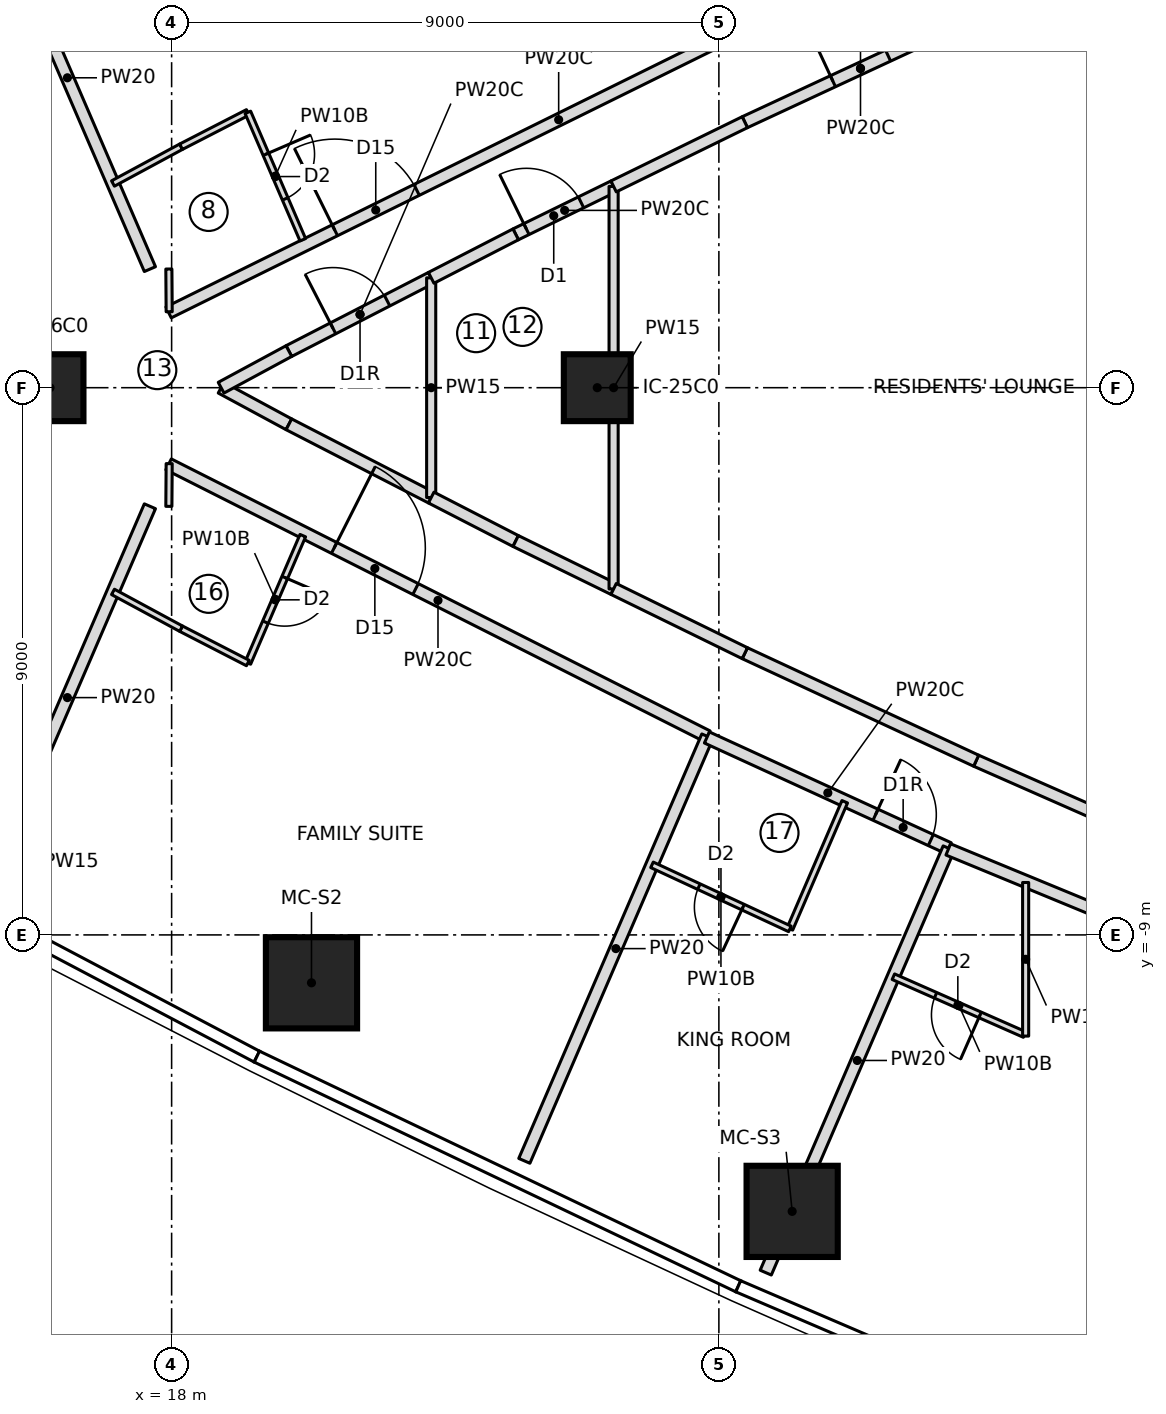
"""IFC4 building model, lengths in metres.
Left out: names, types, materials, properties, quantities, classifications, styles, units other than length and angle.
Written with IfcOpenShell. Run it as: python <this file> out.ifc"""

import sys

from ifc_helpers import new_model, si_unit, direction, frame, frame_2d, origin, origin_2d, place, context, subcontext, project, spatial, rectangle, extrude, element, fill, save


model = new_model("IFC4")
c1 = context("Model", 3, precision=1e-05, world=origin(), true_north=direction((0.0, 1.0)))
c2 = subcontext(c1, "Body", "Model", "MODEL_VIEW")
j1 = project(units=[si_unit("LENGTHUNIT", "METRE"), si_unit("PLANEANGLEUNIT", "RADIAN")], contexts=[c1])
p1 = place(None, origin())
s1 = spatial("IfcSite", under=j1, at=p1, CompositionType="ELEMENT")
p2 = place(p1, origin())
s2 = spatial("IfcBuilding", under=s1, at=p2, CompositionType="ELEMENT")
p3 = place(p2, frame((0.0, 0.0, 130.2)))
s3 = spatial("IfcBuildingStorey", under=s2, at=p3, CompositionType="ELEMENT", Elevation=130.2)
for number, where, z_axis, x_axis in (
    (1, (20.3, -9.788, 0.0), (0.0, 0.0, 1.0), (1.0, 0.0, 0.0)),
    (2, (28.205, -13.547, 0.0), (0.0, 0.0, 1.0), (1.0, 0.0, 0.0)),
):
    element("IfcColumn", number, at=place(p3, frame(where, z_axis=z_axis, x_axis=x_axis)), inside=s3, PredefinedType="COLUMN", context=c2, shape_type="SweptSolid", body=[
        extrude(rectangle(XDim=1.5, YDim=1.5, at=origin_2d()), origin(), (0.0, 0.0, 1.0), 3.55),
    ])
for number, where, z_axis, x_axis in (
    (3, (16.0, 0.0, 0.0), (0.0, 0.0, 1.0), (1.0, 0.0, 0.0)),
    (4, (25.0, 0.0, 0.0), (0.0, 0.0, 1.0), (1.0, 0.0, 0.0)),
):
    element("IfcColumn", number, at=place(p3, frame(where, z_axis=z_axis, x_axis=x_axis)), inside=s3, PredefinedType="COLUMN", context=c2, shape_type="SweptSolid", body=[
        extrude(rectangle(XDim=1.1, YDim=1.1, at=origin_2d()), origin(), (0.0, 0.0, 1.0), 3.55),
    ])
p4 = place(p3, frame((17.643, 1.95, 0.0), z_axis=(0.0, 0.0, 1.0), x_axis=(-0.395994543879, 0.918252863441, 0.0)))
e5 = element("IfcWall", 5, at=p4, inside=s3, PredefinedType="PARTITIONING", context=c2, shape_type="SweptSolid", body=[
    extrude(rectangle(XDim=6.854, YDim=0.2, at=frame_2d((3.427, 0.0))), origin(), (0.0, 0.0, 1.0), 3.25),
])
p5 = place(p3, frame((17.95, 1.238, 0.0), z_axis=(0.0, 0.0, 1.0), x_axis=(0.896593504408, 0.44285447706, 0.0)))
e6 = element("IfcWall", 6, at=p5, inside=s3, PredefinedType="PARTITIONING", context=c2, shape_type="SweptSolid", body=[
    extrude(rectangle(XDim=14.31, YDim=0.2, at=frame_2d((7.155, 0.0))), origin(), (0.0, 0.0, 1.0), 3.25),
])
p6 = place(p5, frame((3.05, 0.0, 0.0)))
e7 = element("IfcOpeningElement", 7, at=p6, cuts=e6, PredefinedType="OPENING", context=c2, shape_type="SweptSolid", body=[
    extrude(rectangle(XDim=1.5, YDim=2.1, at=frame_2d((0.75, 1.05))), frame((0.0, 0.11, 0.0), z_axis=(0.0, -1.0, 0.0), x_axis=(1.0, 0.0, 0.0)), (0.0, 0.0, 1.0), 0.22),
])
p7 = place(p3, frame((17.036, 3.358, 0.0), z_axis=(0.0, 0.0, 1.0), x_axis=(0.879823588489, 0.475300382009, 0.0)))
e8 = element("IfcWall", 8, at=p7, inside=s3, PredefinedType="PARTITIONING", context=c2, shape_type="SweptSolid", body=[
    extrude(rectangle(XDim=1.273, YDim=0.1, at=frame_2d((0.636, 0.0))), origin(), (0.0, 0.0, 1.0), 3.25),
])
p8 = place(p3, frame((18.156, 3.963, 0.0), z_axis=(0.0, 0.0, 1.0), x_axis=(0.889106231322, 0.457700895154, 0.0)))
e9 = element("IfcWall", 9, at=p8, inside=s3, PredefinedType="PARTITIONING", context=c2, shape_type="SweptSolid", body=[
    extrude(rectangle(XDim=1.235, YDim=0.1, at=frame_2d((0.617, 0.0))), origin(), (0.0, 0.0, 1.0), 3.25),
])
p9 = place(p3, frame((19.254, 4.529, 0.0), z_axis=(0.0, 0.0, 1.0), x_axis=(0.395958457437, -0.9182684248, 0.0)))
e10 = element("IfcWall", 10, at=p9, inside=s3, PredefinedType="PARTITIONING", context=c2, shape_type="SweptSolid", body=[
    extrude(rectangle(XDim=2.282, YDim=0.1, at=frame_2d((1.141, 0.0))), origin(), (0.0, 0.0, 1.0), 3.25),
])
p10 = place(p9, frame((0.75, 0.0, 0.0)))
e11 = element("IfcOpeningElement", 11, at=p10, cuts=e10, PredefinedType="OPENING", context=c2, shape_type="SweptSolid", body=[
    extrude(rectangle(XDim=0.8, YDim=2.1, at=frame_2d((0.4, 1.05))), frame((0.0, 0.06, 0.0), z_axis=(0.0, -1.0, 0.0), x_axis=(1.0, 0.0, 0.0)), (0.0, 0.0, 1.0), 0.12),
])
p11 = place(p3, frame((14.929, -8.244, 0.0), z_axis=(0.0, 0.0, 1.0), x_axis=(0.395994543879, 0.918252863441, 0.0)))
e12 = element("IfcWall", 12, at=p11, inside=s3, PredefinedType="PARTITIONING", context=c2, shape_type="SweptSolid", body=[
    extrude(rectangle(XDim=6.854, YDim=0.2, at=frame_2d((3.427, 0.0))), origin(), (0.0, 0.0, 1.0), 3.25),
])
p12 = place(p3, frame((17.95, -1.261, 0.0), z_axis=(0.0, 0.0, 1.0), x_axis=(0.892679126003, -0.450692775623, 0.0)))
e13 = element("IfcWall", 13, at=p12, inside=s3, PredefinedType="PARTITIONING", context=c2, shape_type="SweptSolid", body=[
    extrude(rectangle(XDim=9.927, YDim=0.2, at=frame_2d((4.963, 0.0))), origin(), (0.0, 0.0, 1.0), 3.25),
])
p13 = place(p12, frame((3.05, 0.0, 0.0)))
e14 = element("IfcOpeningElement", 14, at=p13, cuts=e13, PredefinedType="OPENING", context=c2, shape_type="SweptSolid", body=[
    extrude(rectangle(XDim=1.5, YDim=2.1, at=frame_2d((0.75, 1.05))), frame((0.0, 0.11, 0.0), z_axis=(0.0, -1.0, 0.0), x_axis=(1.0, 0.0, 0.0)), (0.0, 0.0, 1.0), 0.22),
])
p14 = place(p3, frame((20.157, -2.433, 0.0), z_axis=(0.0, 0.0, 1.0), x_axis=(-0.395958457437, -0.9182684248, 0.0)))
e15 = element("IfcWall", 15, at=p14, inside=s3, PredefinedType="PARTITIONING", context=c2, shape_type="SweptSolid", body=[
    extrude(rectangle(XDim=2.282, YDim=0.1, at=frame_2d((1.141, 0.0))), origin(), (0.0, 0.0, 1.0), 3.25),
])
p15 = place(p14, frame((0.75, 0.0, 0.0)))
e16 = element("IfcOpeningElement", 16, at=p15, cuts=e15, PredefinedType="OPENING", context=c2, shape_type="SweptSolid", body=[
    extrude(rectangle(XDim=0.8, YDim=2.1, at=frame_2d((0.4, 1.05))), frame((0.0, 0.06, 0.0), z_axis=(0.0, -1.0, 0.0), x_axis=(1.0, 0.0, 0.0)), (0.0, 0.0, 1.0), 0.12),
])
p16 = place(p3, frame((19.253, -4.529, 0.0), z_axis=(0.0, 0.0, 1.0), x_axis=(-0.889106231322, 0.457700895154, 0.0)))
e17 = element("IfcWall", 17, at=p16, inside=s3, PredefinedType="PARTITIONING", context=c2, shape_type="SweptSolid", body=[
    extrude(rectangle(XDim=1.235, YDim=0.1, at=frame_2d((0.617, 0.0))), origin(), (0.0, 0.0, 1.0), 3.25),
])
p17 = place(p3, frame((18.156, -3.963, 0.0), z_axis=(0.0, 0.0, 1.0), x_axis=(-0.879823588489, 0.475300382009, 0.0)))
e18 = element("IfcWall", 18, at=p17, inside=s3, PredefinedType="PARTITIONING", context=c2, shape_type="SweptSolid", body=[
    extrude(rectangle(XDim=1.273, YDim=0.1, at=frame_2d((0.636, 0.0))), origin(), (0.0, 0.0, 1.0), 3.25),
])
p18 = place(p3, frame((23.801, -12.716, 0.0), z_axis=(0.0, 0.0, 1.0), x_axis=(0.395995556294, 0.918252426839, 0.0)))
e19 = element("IfcWall", 19, at=p18, inside=s3, PredefinedType="PARTITIONING", context=c2, shape_type="SweptSolid", body=[
    extrude(rectangle(XDim=7.603, YDim=0.2, at=frame_2d((3.802, 0.0))), origin(), (0.0, 0.0, 1.0), 3.25),
])
p19 = place(p3, frame((26.803, -5.753, 0.0), z_axis=(0.0, 0.0, 1.0), x_axis=(0.90910092787, -0.416575926987, 0.0)))
e20 = element("IfcWall", 20, at=p19, inside=s3, PredefinedType="PARTITIONING", context=c2, shape_type="SweptSolid", body=[
    extrude(rectangle(XDim=4.375, YDim=0.2, at=frame_2d((2.188, 0.0))), origin(), (0.0, 0.0, 1.0), 3.25),
])
p20 = place(p19, frame((3.05, 0.0, 0.0)))
e21 = element("IfcOpeningElement", 21, at=p20, cuts=e20, PredefinedType="OPENING", context=c2, shape_type="SweptSolid", body=[
    extrude(rectangle(XDim=1.0, YDim=2.1, at=frame_2d((0.5, 1.05))), frame((0.0, 0.11, 0.0), z_axis=(0.0, -1.0, 0.0), x_axis=(1.0, 0.0, 0.0)), (0.0, 0.0, 1.0), 0.22),
])
p21 = place(p3, frame((29.07, -6.81, 0.0), z_axis=(0.0, 0.0, 1.0), x_axis=(-0.396000751487, -0.918250186399, 0.0)))
e22 = element("IfcWall", 22, at=p21, inside=s3, PredefinedType="PARTITIONING", context=c2, shape_type="SweptSolid", body=[
    extrude(rectangle(XDim=2.278, YDim=0.1, at=frame_2d((1.139, 0.0))), origin(), (0.0, 0.0, 1.0), 3.25),
])
p22 = place(p3, frame((28.168, -8.902, 0.0), z_axis=(0.0, 0.0, 1.0), x_axis=(-0.906813113059, 0.421532890751, 0.0)))
e23 = element("IfcWall", 23, at=p22, inside=s3, PredefinedType="PARTITIONING", context=c2, shape_type="SweptSolid", body=[
    extrude(rectangle(XDim=2.501, YDim=0.1, at=frame_2d((1.25, 0.0))), origin(), (0.0, 0.0, 1.0), 3.25),
])
p23 = place(p22, frame((0.85, 0.0, 0.0)))
e24 = element("IfcOpeningElement", 24, at=p23, cuts=e23, PredefinedType="OPENING", context=c2, shape_type="SweptSolid", body=[
    extrude(rectangle(XDim=0.8, YDim=2.1, at=frame_2d((0.4, 1.05))), frame((0.0, 0.06, 0.0), z_axis=(0.0, -1.0, 0.0), x_axis=(1.0, 0.0, 0.0)), (0.0, 0.0, 1.0), 0.12),
])
p24 = place(p3, frame((27.771, -14.554, 0.0), z_axis=(0.0, 0.0, 1.0), x_axis=(0.396004020147, 0.918248776763, 0.0)))
e25 = element("IfcWall", 25, at=p24, inside=s3, PredefinedType="PARTITIONING", context=c2, shape_type="SweptSolid", body=[
    extrude(rectangle(XDim=7.6, YDim=0.2, at=frame_2d((3.8, 0.0))), origin(), (0.0, 0.0, 1.0), 3.25),
])
p25 = place(p3, frame((30.772, -7.594, 0.0), z_axis=(0.0, 0.0, 1.0), x_axis=(0.924461873383, -0.381274500407, 0.0)))
e26 = element("IfcWall", 26, at=p25, inside=s3, PredefinedType="PARTITIONING", context=c2, shape_type="SweptSolid", body=[
    extrude(rectangle(XDim=13.127, YDim=0.2, at=frame_2d((6.564, 0.0))), origin(), (0.0, 0.0, 1.0), 3.25),
])
p26 = place(p25, frame((4.25, 0.0, 0.0)))
e27 = element("IfcOpeningElement", 27, at=p26, cuts=e26, PredefinedType="OPENING", context=c2, shape_type="SweptSolid", body=[
    extrude(rectangle(XDim=1.5, YDim=2.1, at=frame_2d((0.75, 1.05))), frame((0.0, 0.11, 0.0), z_axis=(0.0, -1.0, 0.0), x_axis=(1.0, 0.0, 0.0)), (0.0, 0.0, 1.0), 0.22),
])
p27 = place(p3, frame((32.028, -10.638, 0.0), z_axis=(0.0, 0.0, 1.0), x_axis=(-0.915108845766, 0.403206895278, 0.0)))
e28 = element("IfcWall", 28, at=p27, inside=s3, PredefinedType="PARTITIONING", context=c2, shape_type="SweptSolid", body=[
    extrude(rectangle(XDim=2.358, YDim=0.1, at=frame_2d((1.179, 0.0))), origin(), (0.0, 0.0, 1.0), 3.25),
])
p28 = place(p27, frame((0.8, 0.0, 0.0)))
e29 = element("IfcOpeningElement", 29, at=p28, cuts=e28, PredefinedType="OPENING", context=c2, shape_type="SweptSolid", body=[
    extrude(rectangle(XDim=0.8, YDim=2.1, at=frame_2d((0.4, 1.05))), frame((0.0, 0.06, 0.0), z_axis=(0.0, -1.0, 0.0), x_axis=(1.0, 0.0, 0.0)), (0.0, 0.0, 1.0), 0.12),
])
p29 = place(p3, frame((19.928, 0.602, 0.0), z_axis=(0.0, 0.0, 1.0), x_axis=(0.889134700325, 0.457645588505, 0.0)))
e30 = element("IfcWall", 30, at=p29, inside=s3, PredefinedType="PARTITIONING", context=c2, shape_type="SweptSolid", body=[
    extrude(rectangle(XDim=2.632, YDim=0.2, at=frame_2d((1.316, 0.0))), origin(), (0.0, 0.0, 1.0), 3.25),
])
p30 = place(p29, frame((0.816, 0.0, 0.0)))
e31 = element("IfcOpeningElement", 31, at=p30, cuts=e30, PredefinedType="OPENING", context=c2, shape_type="SweptSolid", body=[
    extrude(rectangle(XDim=1.0, YDim=2.1, at=frame_2d((0.5, 1.05))), frame((0.0, 0.11, 0.0), z_axis=(0.0, -1.0, 0.0), x_axis=(1.0, 0.0, 0.0)), (0.0, 0.0, 1.0), 0.22),
])
for number, where, z_axis, x_axis in (
    (32, (19.928, -0.602, 0.0), (0.0, 0.0, 1.0), (-0.88, 0.475, 0.0)),
    (33, (18.814, 0.0, 0.0), (0.0, 0.0, 1.0), (0.88, 0.475, 0.0)),
):
    element("IfcWall", number, at=place(p3, frame(where, z_axis=z_axis, x_axis=x_axis)), inside=s3, PredefinedType="PARTITIONING", context=c2, shape_type="SweptSolid", body=[
        extrude(rectangle(XDim=1.267, YDim=0.2, at=frame_2d((0.633, 0.0))), origin(), (0.0, 0.0, 1.0), 3.25),
    ])
p31 = place(p3, frame((22.269, -1.807, 0.0), z_axis=(0.0, 0.0, 1.0), x_axis=(-0.889134700325, 0.457645588505, 0.0)))
e34 = element("IfcWall", 34, at=p31, inside=s3, PredefinedType="PARTITIONING", context=c2, shape_type="SweptSolid", body=[
    extrude(rectangle(XDim=2.632, YDim=0.2, at=frame_2d((1.316, 0.0))), origin(), (0.0, 0.0, 1.0), 3.25),
])
p32 = place(p3, frame((22.269, -1.807, 0.0), z_axis=(0.0, 0.0, 1.0), x_axis=(0.0, 1.0, 0.0)))
e35 = element("IfcWall", 35, at=p32, inside=s3, PredefinedType="PARTITIONING", context=c2, shape_type="SweptSolid", body=[
    extrude(rectangle(XDim=3.613, YDim=0.15, at=frame_2d((1.807, 0.0))), origin(), (0.0, 0.0, 1.0), 3.25),
])
p33 = place(p3, frame((23.659, 2.522, 0.0), z_axis=(0.0, 0.0, 1.0), x_axis=(0.898127473276, 0.439735195028, 0.0)))
e36 = element("IfcWall", 36, at=p33, inside=s3, PredefinedType="PARTITIONING", context=c2, shape_type="SweptSolid", body=[
    extrude(rectangle(XDim=1.793, YDim=0.2, at=frame_2d((0.896, 0.0))), origin(), (0.0, 0.0, 1.0), 3.25),
])
p34 = place(p33, frame((0.196, 0.0, 0.0)))
e37 = element("IfcOpeningElement", 37, at=p34, cuts=e36, PredefinedType="OPENING", context=c2, shape_type="SweptSolid", body=[
    extrude(rectangle(XDim=1.0, YDim=2.1, at=frame_2d((0.5, 1.05))), frame((0.0, 0.11, 0.0), z_axis=(0.0, -1.0, 0.0), x_axis=(1.0, 0.0, 0.0)), (0.0, 0.0, 1.0), 0.22),
])
for number, where, z_axis, x_axis in (
    (38, (23.659, -2.522, 0.0), (0.0, 0.0, 1.0), (-0.889, 0.458, 0.0)),
    (39, (22.269, 1.807, 0.0), (0.0, 0.0, 1.0), (0.889, 0.458, 0.0)),
):
    element("IfcWall", number, at=place(p3, frame(where, z_axis=z_axis, x_axis=x_axis)), inside=s3, PredefinedType="PARTITIONING", context=c2, shape_type="SweptSolid", body=[
        extrude(rectangle(XDim=1.563, YDim=0.2, at=frame_2d((0.782, 0.0))), origin(), (0.0, 0.0, 1.0), 3.25),
    ])
p35 = place(p3, frame((25.269, -3.31, 0.0), z_axis=(0.0, 0.0, 1.0), x_axis=(-0.898127473276, 0.439735195028, 0.0)))
e40 = element("IfcWall", 40, at=p35, inside=s3, PredefinedType="PARTITIONING", context=c2, shape_type="SweptSolid", body=[
    extrude(rectangle(XDim=1.793, YDim=0.2, at=frame_2d((0.896, 0.0))), origin(), (0.0, 0.0, 1.0), 3.25),
])
p36 = place(p3, frame((25.269, -3.31, 0.0), z_axis=(0.0, 0.0, 1.0), x_axis=(0.0, 1.0, 0.0)))
e41 = element("IfcWall", 41, at=p36, inside=s3, PredefinedType="PARTITIONING", context=c2, shape_type="SweptSolid", body=[
    extrude(rectangle(XDim=6.621, YDim=0.15, at=frame_2d((3.31, 0.0))), origin(), (0.0, 0.0, 1.0), 3.25),
])
p37 = place(p3, frame((27.427, 4.367, 0.0), z_axis=(0.0, 0.0, 1.0), x_axis=(0.906830275285, 0.421495968933, 0.0)))
e42 = element("IfcWall", 42, at=p37, inside=s3, PredefinedType="PARTITIONING", context=c2, shape_type="SweptSolid", body=[
    extrude(rectangle(XDim=4.195, YDim=0.2, at=frame_2d((2.098, 0.0))), origin(), (0.0, 0.0, 1.0), 3.25),
])
p38 = place(p37, frame((1.598, 0.0, 0.0)))
e43 = element("IfcOpeningElement", 43, at=p38, cuts=e42, PredefinedType="OPENING", context=c2, shape_type="SweptSolid", body=[
    extrude(rectangle(XDim=1.0, YDim=2.1, at=frame_2d((0.5, 1.05))), frame((0.0, 0.11, 0.0), z_axis=(0.0, -1.0, 0.0), x_axis=(1.0, 0.0, 0.0)), (0.0, 0.0, 1.0), 0.22),
])
p39 = place(p3, frame((33.308, -7.05, 0.0), z_axis=(0.0, 0.0, 1.0), x_axis=(-0.915102334452, 0.403221672881, 0.0)))
e44 = element("IfcWall", 44, at=p39, inside=s3, PredefinedType="PARTITIONING", context=c2, shape_type="SweptSolid", body=[
    extrude(rectangle(XDim=2.269, YDim=0.2, at=frame_2d((1.135, 0.0))), origin(), (0.0, 0.0, 1.0), 3.25),
])
p40 = place(p3, frame((31.231, -6.135, 0.0), z_axis=(0.0, 0.0, 1.0), x_axis=(-0.906830275285, 0.421495968933, 0.0)))
e45 = element("IfcWall", 45, at=p40, inside=s3, PredefinedType="PARTITIONING", context=c2, shape_type="SweptSolid", body=[
    extrude(rectangle(XDim=4.195, YDim=0.2, at=frame_2d((2.098, 0.0))), origin(), (0.0, 0.0, 1.0), 3.25),
])
for number, where, z_axis, x_axis in (
    (46, (27.427, -4.367, 0.0), (0.0, 0.0, 1.0), (-0.898, 0.44, 0.0)),
    (47, (25.269, 3.31, 0.0), (0.0, 0.0, 1.0), (0.898, 0.44, 0.0)),
):
    element("IfcWall", number, at=place(p3, frame(where, z_axis=z_axis, x_axis=x_axis)), inside=s3, PredefinedType="PARTITIONING", context=c2, shape_type="SweptSolid", body=[
        extrude(rectangle(XDim=2.403, YDim=0.2, at=frame_2d((1.201, 0.0))), origin(), (0.0, 0.0, 1.0), 3.25),
    ])
for number, where, z_axis, x_axis in (
    (48, (17.96, 1.249, 0.0), (0.0, 0.0, 1.0), (-0.007, 1.0, 0.0)),
    (49, (17.955, -1.952, 0.0), (0.0, 0.0, 1.0), (0.007, 1.0, 0.0)),
):
    element("IfcWall", number, at=place(p3, frame(where, z_axis=z_axis, x_axis=x_axis)), inside=s3, PredefinedType="PARTITIONING", context=c2, shape_type="SweptSolid", body=[
        extrude(rectangle(XDim=0.703, YDim=0.1, at=frame_2d((0.352, 0.0))), origin(), (0.0, 0.0, 1.0), 3.25),
    ])
p41 = place(p3, frame((32.045, -8.138, 0.0), z_axis=(0.0, 0.0, 1.0), x_axis=(0.0, -1.0, 0.0)))
e50 = element("IfcWall", 50, at=p41, inside=s3, PredefinedType="PARTITIONING", context=c2, shape_type="SweptSolid", body=[
    extrude(rectangle(XDim=2.526, YDim=0.1, at=frame_2d((1.263, 0.0))), origin(), (0.0, 0.0, 1.0), 3.25),
])
p42 = place(p10, origin())
e51 = element("IfcDoor", 51, at=p42, inside=s3, OperationType="SINGLE_SWING_LEFT", PredefinedType="DOOR", context=c2, shape_type="SweptSolid", body=[
    extrude(rectangle(XDim=0.8, YDim=2.1, at=frame_2d((0.4, 1.05))), frame((0.0, 0.025, 0.0), z_axis=(0.0, -1.0, 0.0), x_axis=(1.0, 0.0, 0.0)), (0.0, 0.0, 1.0), 0.05),
])
fill(e11, e51)
p43 = place(p6, origin())
e52 = element("IfcDoor", 52, at=p43, inside=s3, OperationType="DOUBLE_DOOR_SINGLE_SWING", PredefinedType="DOOR", context=c2, shape_type="SweptSolid", body=[
    extrude(rectangle(XDim=1.5, YDim=2.1, at=frame_2d((0.75, 1.05))), frame((0.0, 0.025, 0.0), z_axis=(0.0, -1.0, 0.0), x_axis=(1.0, 0.0, 0.0)), (0.0, 0.0, 1.0), 0.05),
])
fill(e7, e52)
p44 = place(p15, origin())
e53 = element("IfcDoor", 53, at=p44, inside=s3, OperationType="SINGLE_SWING_LEFT", PredefinedType="DOOR", context=c2, shape_type="SweptSolid", body=[
    extrude(rectangle(XDim=0.8, YDim=2.1, at=frame_2d((0.4, 1.05))), frame((0.0, 0.025, 0.0), z_axis=(0.0, -1.0, 0.0), x_axis=(1.0, 0.0, 0.0)), (0.0, 0.0, 1.0), 0.05),
])
fill(e16, e53)
p45 = place(p13, origin())
e54 = element("IfcDoor", 54, at=p45, inside=s3, OperationType="DOUBLE_DOOR_SINGLE_SWING", PredefinedType="DOOR", context=c2, shape_type="SweptSolid", body=[
    extrude(rectangle(XDim=1.5, YDim=2.1, at=frame_2d((0.75, 1.05))), frame((0.0, 0.025, 0.0), z_axis=(0.0, -1.0, 0.0), x_axis=(1.0, 0.0, 0.0)), (0.0, 0.0, 1.0), 0.05),
])
fill(e14, e54)
p46 = place(p23, origin())
e55 = element("IfcDoor", 55, at=p46, inside=s3, OperationType="SINGLE_SWING_LEFT", PredefinedType="DOOR", context=c2, shape_type="SweptSolid", body=[
    extrude(rectangle(XDim=0.8, YDim=2.1, at=frame_2d((0.4, 1.05))), frame((0.0, 0.025, 0.0), z_axis=(0.0, -1.0, 0.0), x_axis=(1.0, 0.0, 0.0)), (0.0, 0.0, 1.0), 0.05),
])
fill(e24, e55)
p47 = place(p20, origin())
e56 = element("IfcDoor", 56, at=p47, inside=s3, OperationType="SINGLE_SWING_RIGHT", PredefinedType="DOOR", context=c2, shape_type="SweptSolid", body=[
    extrude(rectangle(XDim=1.0, YDim=2.1, at=frame_2d((0.5, 1.05))), frame((0.0, 0.025, 0.0), z_axis=(0.0, -1.0, 0.0), x_axis=(1.0, 0.0, 0.0)), (0.0, 0.0, 1.0), 0.05),
])
fill(e21, e56)
p48 = place(p28, origin())
e57 = element("IfcDoor", 57, at=p48, inside=s3, OperationType="SINGLE_SWING_LEFT", PredefinedType="DOOR", context=c2, shape_type="SweptSolid", body=[
    extrude(rectangle(XDim=0.8, YDim=2.1, at=frame_2d((0.4, 1.05))), frame((0.0, 0.025, 0.0), z_axis=(0.0, -1.0, 0.0), x_axis=(1.0, 0.0, 0.0)), (0.0, 0.0, 1.0), 0.05),
])
fill(e29, e57)
p49 = place(p30, origin())
e58 = element("IfcDoor", 58, at=p49, inside=s3, OperationType="SINGLE_SWING_RIGHT", PredefinedType="DOOR", context=c2, shape_type="SweptSolid", body=[
    extrude(rectangle(XDim=1.0, YDim=2.1, at=frame_2d((0.5, 1.05))), frame((0.0, 0.025, 0.0), z_axis=(0.0, -1.0, 0.0), x_axis=(1.0, 0.0, 0.0)), (0.0, 0.0, 1.0), 0.05),
])
fill(e31, e58)
p50 = place(p34, origin())
e59 = element("IfcDoor", 59, at=p50, inside=s3, OperationType="SINGLE_SWING_LEFT", PredefinedType="DOOR", context=c2, shape_type="SweptSolid", body=[
    extrude(rectangle(XDim=1.0, YDim=2.1, at=frame_2d((0.5, 1.05))), frame((0.0, 0.025, 0.0), z_axis=(0.0, -1.0, 0.0), x_axis=(1.0, 0.0, 0.0)), (0.0, 0.0, 1.0), 0.05),
])
fill(e37, e59)
p51 = place(p38, origin())
e60 = element("IfcDoor", 60, at=p51, inside=s3, OperationType="SINGLE_SWING_RIGHT", PredefinedType="DOOR", context=c2, shape_type="SweptSolid", body=[
    extrude(rectangle(XDim=1.0, YDim=2.1, at=frame_2d((0.5, 1.05))), frame((0.0, 0.025, 0.0), z_axis=(0.0, -1.0, 0.0), x_axis=(1.0, 0.0, 0.0)), (0.0, 0.0, 1.0), 0.05),
])
fill(e43, e60)
save(model, sys.argv[1])
